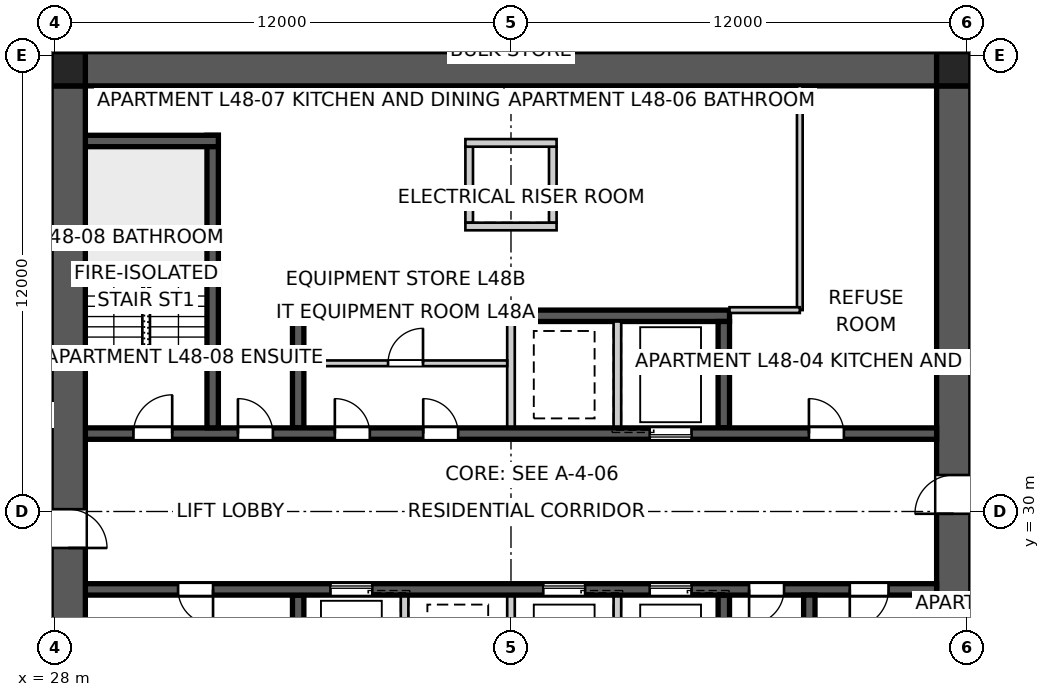
"""IFC4 building model, lengths in metres.
Left out: names, types, materials, properties, quantities, classifications, styles, units other than length and angle.
Written with IfcOpenShell. Run it as: python <this file> out.ifc"""

import sys

from ifc_helpers import new_model, si_unit, direction, frame, frame_2d, origin, origin_2d, place, context, subcontext, project, spatial, polyline, rectangle, outline, extrude, element, fill, save


model = new_model("IFC4")
c1 = context("Model", 3, precision=1e-05, world=origin(), true_north=direction((0.0, 1.0)))
c2 = subcontext(c1, "Body", "Model", "MODEL_VIEW")
j1 = project(units=[si_unit("LENGTHUNIT", "METRE"), si_unit("PLANEANGLEUNIT", "RADIAN")], contexts=[c1])
p1 = place(None, origin())
s1 = spatial("IfcSite", under=j1, at=p1, CompositionType="ELEMENT")
p2 = place(p1, origin())
s2 = spatial("IfcBuilding", under=s1, at=p2, CompositionType="ELEMENT")
p3 = place(p2, frame((0.0, 0.0, 176.0)))
s3 = spatial("IfcBuildingStorey", under=s2, at=p3, CompositionType="ELEMENT", Elevation=176.0)
p4 = place(p3, frame((28.8, 41.65, 0.0), z_axis=(0.0, 0.0, 1.0), x_axis=(1.0, 0.0, 0.0)))
e1 = element("IfcWall", 1, at=p4, inside=s3, PredefinedType="SHEAR", context=c2, shape_type="SweptSolid", body=[
    extrude(outline(polyline([(0.0, -0.45), (22.4, -0.45), (22.4, -0.025), (22.85, -0.025), (22.85, 0.025), (22.4, 0.025), (22.4, 0.45), (0.0, 0.45), (0.0, 0.025), (-0.45, 0.025), (-0.45, -0.025), (0.0, -0.025), (0.0, -0.45)])), origin(), (0.0, 0.0, 1.0), 3.4),
])
p5 = place(p3, frame((51.65, 18.8, 0.0), z_axis=(0.0, 0.0, 1.0), x_axis=(0.0, 1.0, 0.0)))
e2 = element("IfcWall", 2, at=p5, inside=s3, PredefinedType="SHEAR", context=c2, shape_type="SweptSolid", body=[
    extrude(outline(polyline([(0.0, -0.45), (22.4, -0.45), (22.4, -0.025), (22.85, -0.025), (22.85, 0.025), (22.4, 0.025), (22.4, 0.45), (0.0, 0.45), (0.0, 0.025), (-0.45, 0.025), (-0.45, -0.025), (0.0, -0.025), (0.0, -0.45)])), origin(), (0.0, 0.0, 1.0), 3.4),
])
p6 = place(p5, frame((11.14, 0.0, 0.0)))
e3 = element("IfcOpeningElement", 3, at=p6, cuts=e2, PredefinedType="OPENING", context=c2, shape_type="SweptSolid", body=[
    extrude(rectangle(XDim=1.02, YDim=2.4, at=frame_2d((0.51, 1.2))), frame((0.0, 0.46, 0.0), z_axis=(0.0, -1.0, 0.0), x_axis=(1.0, 0.0, 0.0)), (0.0, 0.0, 1.0), 0.92),
])
p7 = place(p3, frame((28.35, 41.2, 0.0), z_axis=(0.0, 0.0, 1.0), x_axis=(0.0, -1.0, 0.0)))
e4 = element("IfcWall", 4, at=p7, inside=s3, PredefinedType="SHEAR", context=c2, shape_type="SweptSolid", body=[
    extrude(outline(polyline([(0.0, -0.45), (22.4, -0.45), (22.4, -0.025), (22.85, -0.025), (22.85, 0.025), (22.4, 0.025), (22.4, 0.45), (0.0, 0.45), (0.0, 0.025), (-0.45, 0.025), (-0.45, -0.025), (0.0, -0.025), (0.0, -0.45)])), origin(), (0.0, 0.0, 1.0), 3.4),
])
p8 = place(p7, frame((11.14, 0.0, 0.0)))
e5 = element("IfcOpeningElement", 5, at=p8, cuts=e4, PredefinedType="OPENING", context=c2, shape_type="SweptSolid", body=[
    extrude(rectangle(XDim=1.02, YDim=2.4, at=frame_2d((0.51, 1.2))), frame((0.0, 0.46, 0.0), z_axis=(0.0, -1.0, 0.0), x_axis=(1.0, 0.0, 0.0)), (0.0, 0.0, 1.0), 0.92),
])
p9 = place(p3, frame((28.8, 32.05, 0.0), z_axis=(0.0, 0.0, 1.0), x_axis=(1.0, 0.0, 0.0)))
e6 = element("IfcWall", 6, at=p9, inside=s3, PredefinedType="SHEAR", context=c2, shape_type="SweptSolid", body=[
    extrude(rectangle(XDim=22.4, YDim=0.3, at=frame_2d((11.2, 0.0))), origin(), (0.0, 0.0, 1.0), 3.4),
])
p10 = place(p9, frame((19.04, 0.0, 0.0)))
e7 = element("IfcOpeningElement", 7, at=p10, cuts=e6, PredefinedType="OPENING", context=c2, shape_type="SweptSolid", body=[
    extrude(rectangle(XDim=0.92, YDim=2.1, at=frame_2d((0.46, 1.05))), frame((0.0, 0.16, 0.0), z_axis=(0.0, -1.0, 0.0), x_axis=(1.0, 0.0, 0.0)), (0.0, 0.0, 1.0), 0.32),
])
p11 = place(p9, frame((1.265, 0.0, 0.0)))
e8 = element("IfcOpeningElement", 8, at=p11, cuts=e6, PredefinedType="OPENING", context=c2, shape_type="SweptSolid", body=[
    extrude(rectangle(XDim=1.02, YDim=2.1, at=frame_2d((0.51, 1.05))), frame((0.0, 0.16, 0.0), z_axis=(0.0, -1.0, 0.0), x_axis=(1.0, 0.0, 0.0)), (0.0, 0.0, 1.0), 0.32),
])
p12 = place(p9, frame((4.015, 0.0, 0.0)))
e9 = element("IfcOpeningElement", 9, at=p12, cuts=e6, PredefinedType="OPENING", context=c2, shape_type="SweptSolid", body=[
    extrude(rectangle(XDim=0.92, YDim=2.1, at=frame_2d((0.46, 1.05))), frame((0.0, 0.16, 0.0), z_axis=(0.0, -1.0, 0.0), x_axis=(1.0, 0.0, 0.0)), (0.0, 0.0, 1.0), 0.32),
])
p13 = place(p9, frame((6.565, 0.0, 0.0)))
e10 = element("IfcOpeningElement", 10, at=p13, cuts=e6, PredefinedType="OPENING", context=c2, shape_type="SweptSolid", body=[
    extrude(rectangle(XDim=0.92, YDim=2.1, at=frame_2d((0.46, 1.05))), frame((0.0, 0.16, 0.0), z_axis=(0.0, -1.0, 0.0), x_axis=(1.0, 0.0, 0.0)), (0.0, 0.0, 1.0), 0.32),
])
p14 = place(p9, frame((8.89, 0.0, 0.0)))
e11 = element("IfcOpeningElement", 11, at=p14, cuts=e6, PredefinedType="OPENING", context=c2, shape_type="SweptSolid", body=[
    extrude(rectangle(XDim=0.92, YDim=2.1, at=frame_2d((0.46, 1.05))), frame((0.0, 0.16, 0.0), z_axis=(0.0, -1.0, 0.0), x_axis=(1.0, 0.0, 0.0)), (0.0, 0.0, 1.0), 0.32),
])
p15 = place(p9, frame((14.85, 0.0, 0.0)))
e12 = element("IfcOpeningElement", 12, at=p15, cuts=e6, PredefinedType="OPENING", context=c2, shape_type="SweptSolid", body=[
    extrude(rectangle(XDim=1.1, YDim=2.1, at=frame_2d((0.55, 1.05))), frame((0.0, 0.16, 0.0), z_axis=(0.0, -1.0, 0.0), x_axis=(1.0, 0.0, 0.0)), (0.0, 0.0, 1.0), 0.32),
])
p16 = place(p3, frame((51.2, 27.95, 0.0), z_axis=(0.0, 0.0, 1.0), x_axis=(-1.0, 0.0, 0.0)))
e13 = element("IfcWall", 13, at=p16, inside=s3, PredefinedType="SHEAR", context=c2, shape_type="SweptSolid", body=[
    extrude(rectangle(XDim=22.4, YDim=0.3, at=frame_2d((11.2, 0.0))), origin(), (0.0, 0.0, 1.0), 3.4),
])
p17 = place(p16, frame((19.04, 0.0, 0.0)))
e14 = element("IfcOpeningElement", 14, at=p17, cuts=e13, PredefinedType="OPENING", context=c2, shape_type="SweptSolid", body=[
    extrude(rectangle(XDim=0.92, YDim=2.1, at=frame_2d((0.46, 1.05))), frame((0.0, 0.16, 0.0), z_axis=(0.0, -1.0, 0.0), x_axis=(1.0, 0.0, 0.0)), (0.0, 0.0, 1.0), 0.32),
])
p18 = place(p16, frame((1.265, 0.0, 0.0)))
e15 = element("IfcOpeningElement", 15, at=p18, cuts=e13, PredefinedType="OPENING", context=c2, shape_type="SweptSolid", body=[
    extrude(rectangle(XDim=1.02, YDim=2.1, at=frame_2d((0.51, 1.05))), frame((0.0, 0.16, 0.0), z_axis=(0.0, -1.0, 0.0), x_axis=(1.0, 0.0, 0.0)), (0.0, 0.0, 1.0), 0.32),
])
p19 = place(p16, frame((4.015, 0.0, 0.0)))
e16 = element("IfcOpeningElement", 16, at=p19, cuts=e13, PredefinedType="OPENING", context=c2, shape_type="SweptSolid", body=[
    extrude(rectangle(XDim=0.92, YDim=2.1, at=frame_2d((0.46, 1.05))), frame((0.0, 0.16, 0.0), z_axis=(0.0, -1.0, 0.0), x_axis=(1.0, 0.0, 0.0)), (0.0, 0.0, 1.0), 0.32),
])
p20 = place(p16, frame((6.45, 0.0, 0.0)))
e17 = element("IfcOpeningElement", 17, at=p20, cuts=e13, PredefinedType="OPENING", context=c2, shape_type="SweptSolid", body=[
    extrude(rectangle(XDim=1.1, YDim=2.1, at=frame_2d((0.55, 1.05))), frame((0.0, 0.16, 0.0), z_axis=(0.0, -1.0, 0.0), x_axis=(1.0, 0.0, 0.0)), (0.0, 0.0, 1.0), 0.32),
])
p21 = place(p16, frame((9.25, 0.0, 0.0)))
e18 = element("IfcOpeningElement", 18, at=p21, cuts=e13, PredefinedType="OPENING", context=c2, shape_type="SweptSolid", body=[
    extrude(rectangle(XDim=1.1, YDim=2.1, at=frame_2d((0.55, 1.05))), frame((0.0, 0.16, 0.0), z_axis=(0.0, -1.0, 0.0), x_axis=(1.0, 0.0, 0.0)), (0.0, 0.0, 1.0), 0.32),
])
p22 = place(p16, frame((14.85, 0.0, 0.0)))
e19 = element("IfcOpeningElement", 19, at=p22, cuts=e13, PredefinedType="OPENING", context=c2, shape_type="SweptSolid", body=[
    extrude(rectangle(XDim=1.1, YDim=2.1, at=frame_2d((0.55, 1.05))), frame((0.0, 0.16, 0.0), z_axis=(0.0, -1.0, 0.0), x_axis=(1.0, 0.0, 0.0)), (0.0, 0.0, 1.0), 0.32),
])
p23 = place(p3, frame((34.25, 35.15, 0.0), z_axis=(0.0, 0.0, 1.0), x_axis=(1.0, 0.0, 0.0)))
e20 = element("IfcWall", 20, at=p23, inside=s3, PredefinedType="SHEAR", context=c2, shape_type="SweptSolid", body=[
    extrude(rectangle(XDim=11.5, YDim=0.3, at=frame_2d((5.75, 0.0))), origin(), (0.0, 0.0, 1.0), 3.4),
])
for number, where, z_axis, x_axis in (
    (21, (34.4, 32.2, 0.0), (0.0, 0.0, 1.0), (0.0, 1.0, 0.0)),
    (22, (45.6, 27.8, 0.0), (0.0, 0.0, 1.0), (0.0, -1.0, 0.0)),
):
    element("IfcWall", number, at=place(p3, frame(where, z_axis=z_axis, x_axis=x_axis)), inside=s3, PredefinedType="SHEAR", context=c2, shape_type="SweptSolid", body=[
        extrude(rectangle(XDim=2.8, YDim=0.3, at=frame_2d((1.4, 0.0))), origin(), (0.0, 0.0, 1.0), 3.4),
    ])
for number, where, z_axis, x_axis in (
    (23, (42.8, 27.8, 0.0), (0.0, 0.0, 1.0), (0.0, -1.0, 0.0)),
    (24, (40.0, 32.2, 0.0), (0.0, 0.0, 1.0), (0.0, 1.0, 0.0)),
    (25, (40.0, 27.8, 0.0), (0.0, 0.0, 1.0), (0.0, -1.0, 0.0)),
    (26, (42.8, 32.2, 0.0), (0.0, 0.0, 1.0), (0.0, 1.0, 0.0)),
    (27, (37.2, 27.8, 0.0), (0.0, 0.0, 1.0), (0.0, -1.0, 0.0)),
):
    element("IfcWall", number, at=place(p3, frame(where, z_axis=z_axis, x_axis=x_axis)), inside=s3, PredefinedType="SOLIDWALL", context=c2, shape_type="SweptSolid", body=[
        extrude(rectangle(XDim=2.8, YDim=0.2, at=frame_2d((1.4, 0.0))), origin(), (0.0, 0.0, 1.0), 3.4),
    ])
for number, where, z_axis, x_axis in (
    (28, (45.6, 32.2, 0.0), (0.0, 0.0, 1.0), (0.0, 1.0, 0.0)),
    (29, (34.4, 27.8, 0.0), (0.0, 0.0, 1.0), (0.0, -1.0, 0.0)),
):
    element("IfcWall", number, at=place(p3, frame(where, z_axis=z_axis, x_axis=x_axis)), inside=s3, PredefinedType="SHEAR", context=c2, shape_type="SweptSolid", body=[
        extrude(rectangle(XDim=2.8, YDim=0.3, at=frame_2d((1.4, 0.0))), origin(), (0.0, 0.0, 1.0), 3.4),
    ])
p24 = place(p3, frame((32.15, 32.2, 0.0), z_axis=(0.0, 0.0, 1.0), x_axis=(0.0, 1.0, 0.0)))
e30 = element("IfcWall", 30, at=p24, inside=s3, PredefinedType="SHEAR", context=c2, shape_type="SweptSolid", body=[
    extrude(rectangle(XDim=7.7, YDim=0.3, at=frame_2d((3.85, 0.0))), origin(), (0.0, 0.0, 1.0), 3.4),
])
p25 = place(p3, frame((28.8, 39.75, 0.0), z_axis=(0.0, 0.0, 1.0), x_axis=(1.0, 0.0, 0.0)))
e31 = element("IfcWall", 31, at=p25, inside=s3, PredefinedType="SHEAR", context=c2, shape_type="SweptSolid", body=[
    extrude(rectangle(XDim=3.5, YDim=0.3, at=frame_2d((1.75, 0.0))), origin(), (0.0, 0.0, 1.0), 3.4),
])
p26 = place(p3, frame((47.85, 27.8, 0.0), z_axis=(0.0, 0.0, 1.0), x_axis=(0.0, -1.0, 0.0)))
e32 = element("IfcWall", 32, at=p26, inside=s3, PredefinedType="SHEAR", context=c2, shape_type="SweptSolid", body=[
    extrude(rectangle(XDim=7.7, YDim=0.3, at=frame_2d((3.85, 0.0))), origin(), (0.0, 0.0, 1.0), 3.4),
])
for number, where, z_axis, x_axis in (
    (33, (38.9, 37.6, 0.0), (0.0, 0.0, 1.0), (0.0, 1.0, 0.0)),
    (34, (41.1, 37.6, 0.0), (0.0, 0.0, 1.0), (0.0, 1.0, 0.0)),
):
    element("IfcWall", number, at=place(p3, frame(where, z_axis=z_axis, x_axis=x_axis)), inside=s3, PredefinedType="SOLIDWALL", context=c2, shape_type="SweptSolid", body=[
        extrude(rectangle(XDim=2.0, YDim=0.2, at=frame_2d((1.0, 0.0))), origin(), (0.0, 0.0, 1.0), 3.4),
    ])
for number, where, z_axis, x_axis in (
    (35, (38.8, 37.5, 0.0), (0.0, 0.0, 1.0), (1.0, 0.0, 0.0)),
    (36, (38.8, 39.7, 0.0), (0.0, 0.0, 1.0), (1.0, 0.0, 0.0)),
):
    element("IfcWall", number, at=place(p3, frame(where, z_axis=z_axis, x_axis=x_axis)), inside=s3, PredefinedType="SOLIDWALL", context=c2, shape_type="SweptSolid", body=[
        extrude(rectangle(XDim=2.4, YDim=0.2, at=frame_2d((1.2, 0.0))), origin(), (0.0, 0.0, 1.0), 3.4),
    ])
for number, where, z_axis, x_axis in (
    (37, (51.65, 41.65, 0.0), (0.0, 0.0, 1.0), (1.0, 0.0, 0.0)),
    (38, (28.35, 41.65, 0.0), (0.0, 0.0, 1.0), (1.0, 0.0, 0.0)),
):
    element("IfcColumn", number, at=place(p3, frame(where, z_axis=z_axis, x_axis=x_axis)), inside=s3, PredefinedType="COLUMN", context=c2, shape_type="SweptSolid", body=[
        extrude(rectangle(XDim=0.9, YDim=0.9, at=origin_2d()), origin(), (0.0, 0.0, 1.0), 3.4),
    ])
p27 = place(p3, frame((47.6, 41.2, 0.0), z_axis=(0.0, 0.0, 1.0), x_axis=(0.0, -1.0, 0.0)))
e39 = element("IfcWall", 39, at=p27, inside=s3, PredefinedType="SOLIDWALL", context=c2, shape_type="SweptSolid", body=[
    extrude(rectangle(XDim=5.9, YDim=0.15, at=frame_2d((2.95, 0.0))), origin(), (0.0, 0.0, 1.0), 3.25),
])
p28 = place(p3, frame((47.6, 35.3, 0.0), z_axis=(0.0, 0.0, 1.0), x_axis=(-1.0, 0.0, 0.0)))
e40 = element("IfcWall", 40, at=p28, inside=s3, PredefinedType="SOLIDWALL", context=c2, shape_type="SweptSolid", body=[
    extrude(rectangle(XDim=1.85, YDim=0.15, at=frame_2d((0.925, 0.0))), origin(), (0.0, 0.0, 1.0), 3.25),
])
p29 = place(p3, frame((27.9, 44.35, 0.0), z_axis=(0.0, 0.0, 1.0), x_axis=(0.0, -1.0, 0.0)))
e41 = element("IfcWall", 41, at=p29, inside=s3, PredefinedType="PARTITIONING", context=c2, shape_type="SweptSolid", body=[
    extrude(rectangle(XDim=2.3, YDim=0.2, at=frame_2d((1.15, 0.0))), origin(), (0.0, 0.0, 1.0), 3.25),
])
p30 = place(p3, frame((52.1, 41.18, 0.0), z_axis=(0.0, 0.0, 1.0), x_axis=(0.0, 1.0, 0.0)))
e42 = element("IfcWall", 42, at=p30, inside=s3, PredefinedType="PARTITIONING", context=c2, shape_type="SweptSolid", body=[
    extrude(rectangle(XDim=3.17, YDim=0.2, at=frame_2d((1.585, 0.0))), origin(), (0.0, 0.0, 1.0), 3.25),
])
p31 = place(p3, frame((34.55, 33.9, 0.0), z_axis=(0.0, 0.0, 1.0), x_axis=(1.0, 0.0, 0.0)))
e43 = element("IfcWall", 43, at=p31, inside=s3, PredefinedType="SOLIDWALL", context=c2, shape_type="SweptSolid", body=[
    extrude(rectangle(XDim=5.35, YDim=0.15, at=frame_2d((2.675, 0.0))), origin(), (0.0, 0.0, 1.0), 3.25),
])
p32 = place(p31, frame((2.215, 0.0, 0.0)))
e44 = element("IfcOpeningElement", 44, at=p32, cuts=e43, PredefinedType="OPENING", context=c2, shape_type="SweptSolid", body=[
    extrude(rectangle(XDim=0.92, YDim=2.1, at=frame_2d((0.46, 1.05))), frame((0.0, 0.085, 0.0), z_axis=(0.0, -1.0, 0.0), x_axis=(1.0, 0.0, 0.0)), (0.0, 0.0, 1.0), 0.17),
])
p33 = place(p10, origin())
e45 = element("IfcDoor", 45, at=p33, inside=s3, OperationType="SINGLE_SWING_LEFT", PredefinedType="DOOR", context=c2, shape_type="SweptSolid", body=[
    extrude(rectangle(XDim=0.92, YDim=2.1, at=frame_2d((0.46, 1.05))), frame((0.0, 0.025, 0.0), z_axis=(0.0, -1.0, 0.0), x_axis=(1.0, 0.0, 0.0)), (0.0, 0.0, 1.0), 0.05),
])
fill(e7, e45)
p34 = place(p17, origin())
e46 = element("IfcDoor", 46, at=p34, inside=s3, OperationType="SINGLE_SWING_LEFT", PredefinedType="DOOR", context=c2, shape_type="SweptSolid", body=[
    extrude(rectangle(XDim=0.92, YDim=2.1, at=frame_2d((0.46, 1.05))), frame((0.0, 0.025, 0.0), z_axis=(0.0, -1.0, 0.0), x_axis=(1.0, 0.0, 0.0)), (0.0, 0.0, 1.0), 0.05),
])
fill(e14, e46)
p35 = place(p18, origin())
e47 = element("IfcDoor", 47, at=p35, inside=s3, OperationType="SINGLE_SWING_RIGHT", PredefinedType="DOOR", context=c2, shape_type="SweptSolid", body=[
    extrude(rectangle(XDim=1.02, YDim=2.1, at=frame_2d((0.51, 1.05))), frame((0.0, 0.025, 0.0), z_axis=(0.0, -1.0, 0.0), x_axis=(1.0, 0.0, 0.0)), (0.0, 0.0, 1.0), 0.05),
])
fill(e15, e47)
p36 = place(p11, origin())
e48 = element("IfcDoor", 48, at=p36, inside=s3, OperationType="SINGLE_SWING_RIGHT", PredefinedType="DOOR", context=c2, shape_type="SweptSolid", body=[
    extrude(rectangle(XDim=1.02, YDim=2.1, at=frame_2d((0.51, 1.05))), frame((0.0, 0.025, 0.0), z_axis=(0.0, -1.0, 0.0), x_axis=(1.0, 0.0, 0.0)), (0.0, 0.0, 1.0), 0.05),
])
fill(e8, e48)
p37 = place(p12, origin())
e49 = element("IfcDoor", 49, at=p37, inside=s3, OperationType="SINGLE_SWING_LEFT", PredefinedType="DOOR", context=c2, shape_type="SweptSolid", body=[
    extrude(rectangle(XDim=0.92, YDim=2.1, at=frame_2d((0.46, 1.05))), frame((0.0, 0.025, 0.0), z_axis=(0.0, -1.0, 0.0), x_axis=(1.0, 0.0, 0.0)), (0.0, 0.0, 1.0), 0.05),
])
fill(e9, e49)
p38 = place(p19, origin())
e50 = element("IfcDoor", 50, at=p38, inside=s3, OperationType="SINGLE_SWING_RIGHT", PredefinedType="DOOR", context=c2, shape_type="SweptSolid", body=[
    extrude(rectangle(XDim=0.92, YDim=2.1, at=frame_2d((0.46, 1.05))), frame((0.0, 0.025, 0.0), z_axis=(0.0, -1.0, 0.0), x_axis=(1.0, 0.0, 0.0)), (0.0, 0.0, 1.0), 0.05),
])
fill(e16, e50)
p39 = place(p13, origin())
e51 = element("IfcDoor", 51, at=p39, inside=s3, OperationType="SINGLE_SWING_LEFT", PredefinedType="DOOR", context=c2, shape_type="SweptSolid", body=[
    extrude(rectangle(XDim=0.92, YDim=2.1, at=frame_2d((0.46, 1.05))), frame((0.0, 0.025, 0.0), z_axis=(0.0, -1.0, 0.0), x_axis=(1.0, 0.0, 0.0)), (0.0, 0.0, 1.0), 0.05),
])
fill(e10, e51)
p40 = place(p14, origin())
e52 = element("IfcDoor", 52, at=p40, inside=s3, OperationType="SINGLE_SWING_LEFT", PredefinedType="DOOR", context=c2, shape_type="SweptSolid", body=[
    extrude(rectangle(XDim=0.92, YDim=2.1, at=frame_2d((0.46, 1.05))), frame((0.0, 0.025, 0.0), z_axis=(0.0, -1.0, 0.0), x_axis=(1.0, 0.0, 0.0)), (0.0, 0.0, 1.0), 0.05),
])
fill(e11, e52)
p41 = place(p32, origin())
e53 = element("IfcDoor", 53, at=p41, inside=s3, OperationType="SINGLE_SWING_RIGHT", PredefinedType="DOOR", context=c2, shape_type="SweptSolid", body=[
    extrude(rectangle(XDim=0.92, YDim=2.1, at=frame_2d((0.46, 1.05))), frame((0.0, 0.025, 0.0), z_axis=(0.0, -1.0, 0.0), x_axis=(1.0, 0.0, 0.0)), (0.0, 0.0, 1.0), 0.05),
])
fill(e44, e53)
p42 = place(p6, origin())
e54 = element("IfcDoor", 54, at=p42, inside=s3, OperationType="SINGLE_SWING_LEFT", PredefinedType="DOOR", context=c2, shape_type="SweptSolid", body=[
    extrude(rectangle(XDim=1.02, YDim=2.4, at=frame_2d((0.51, 1.2))), frame((0.0, 0.025, 0.0), z_axis=(0.0, -1.0, 0.0), x_axis=(1.0, 0.0, 0.0)), (0.0, 0.0, 1.0), 0.05),
])
fill(e3, e54)
p43 = place(p8, origin())
e55 = element("IfcDoor", 55, at=p43, inside=s3, OperationType="SINGLE_SWING_RIGHT", PredefinedType="DOOR", context=c2, shape_type="SweptSolid", body=[
    extrude(rectangle(XDim=1.02, YDim=2.4, at=frame_2d((0.51, 1.2))), frame((0.0, 0.025, 0.0), z_axis=(0.0, -1.0, 0.0), x_axis=(1.0, 0.0, 0.0)), (0.0, 0.0, 1.0), 0.05),
])
fill(e5, e55)
p44 = place(p20, origin())
e56 = element("IfcDoor", 56, at=p44, inside=s3, OperationType="SLIDING_TO_LEFT", PredefinedType="DOOR", context=c2, shape_type="SweptSolid", body=[
    extrude(rectangle(XDim=1.1, YDim=2.1, at=frame_2d((0.55, 1.05))), frame((0.0, 0.025, 0.0), z_axis=(0.0, -1.0, 0.0), x_axis=(1.0, 0.0, 0.0)), (0.0, 0.0, 1.0), 0.05),
])
fill(e17, e56)
p45 = place(p21, origin())
e57 = element("IfcDoor", 57, at=p45, inside=s3, OperationType="SLIDING_TO_LEFT", PredefinedType="DOOR", context=c2, shape_type="SweptSolid", body=[
    extrude(rectangle(XDim=1.1, YDim=2.1, at=frame_2d((0.55, 1.05))), frame((0.0, 0.025, 0.0), z_axis=(0.0, -1.0, 0.0), x_axis=(1.0, 0.0, 0.0)), (0.0, 0.0, 1.0), 0.05),
])
fill(e18, e57)
p46 = place(p15, origin())
e58 = element("IfcDoor", 58, at=p46, inside=s3, OperationType="SLIDING_TO_LEFT", PredefinedType="DOOR", context=c2, shape_type="SweptSolid", body=[
    extrude(rectangle(XDim=1.1, YDim=2.1, at=frame_2d((0.55, 1.05))), frame((0.0, 0.025, 0.0), z_axis=(0.0, -1.0, 0.0), x_axis=(1.0, 0.0, 0.0)), (0.0, 0.0, 1.0), 0.05),
])
fill(e12, e58)
p47 = place(p22, origin())
e59 = element("IfcDoor", 59, at=p47, inside=s3, OperationType="SLIDING_TO_LEFT", PredefinedType="DOOR", context=c2, shape_type="SweptSolid", body=[
    extrude(rectangle(XDim=1.1, YDim=2.1, at=frame_2d((0.55, 1.05))), frame((0.0, 0.025, 0.0), z_axis=(0.0, -1.0, 0.0), x_axis=(1.0, 0.0, 0.0)), (0.0, 0.0, 1.0), 0.05),
])
fill(e19, e59)
save(model, sys.argv[1])
